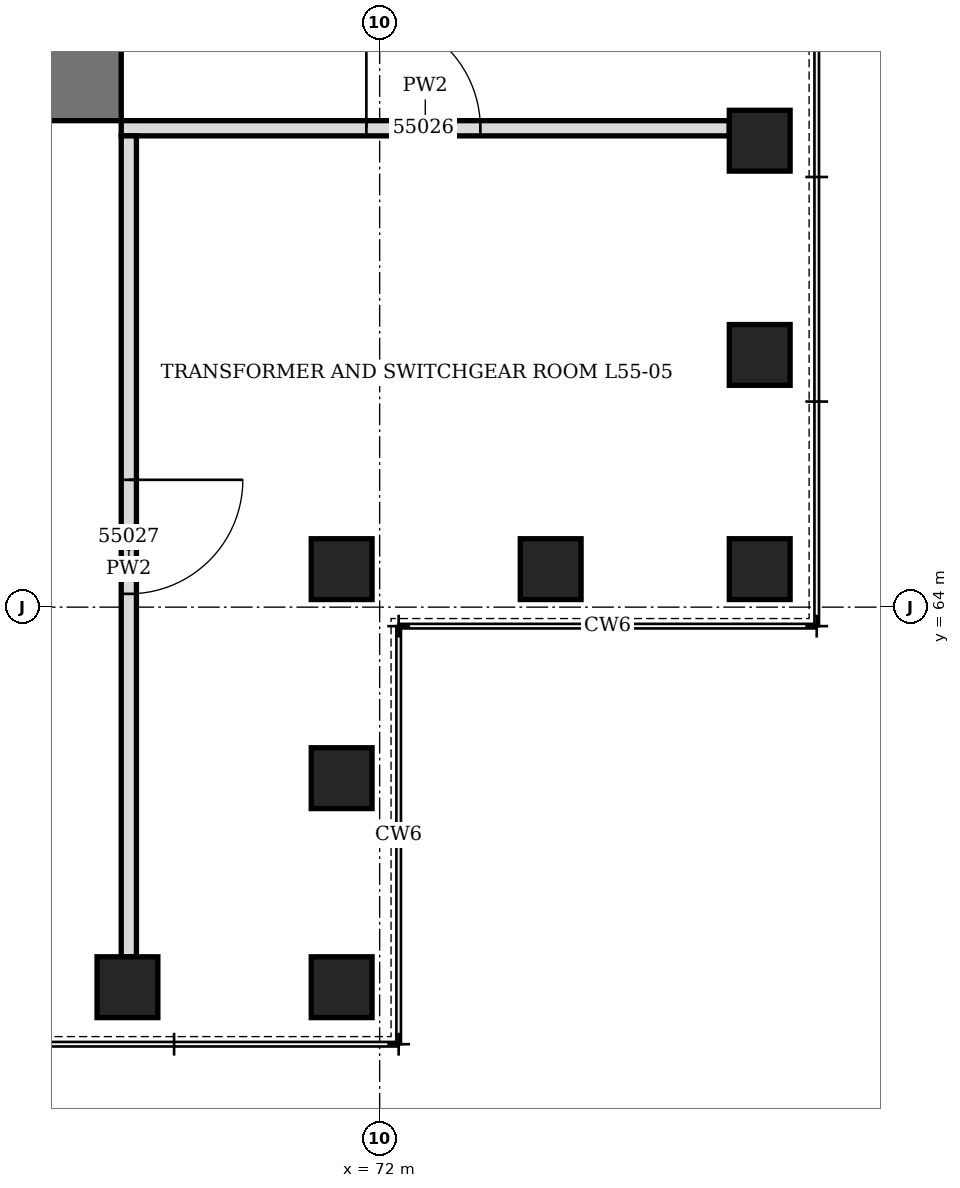
"""IFC4 building model, lengths in metres.
Left out: names, types, materials, properties, quantities, classifications, styles, units other than length and angle.
Written with IfcOpenShell. Run it as: python <this file> out.ifc"""

import sys

from ifc_helpers import new_model, si_unit, direction, frame, frame_2d, origin, origin_2d, place, context, subcontext, project, spatial, rectangle, hollow_rectangle, extrude, element, fill, save


model = new_model("IFC4")
c1 = context("Model", 3, precision=1e-05, world=origin(), true_north=direction((0.0, 1.0)))
c2 = subcontext(c1, "Body", "Model", "MODEL_VIEW")
j1 = project(units=[si_unit("LENGTHUNIT", "METRE"), si_unit("PLANEANGLEUNIT", "RADIAN")], contexts=[c1])
p1 = place(None, origin())
s1 = spatial("IfcSite", under=j1, at=p1, CompositionType="ELEMENT")
p2 = place(p1, origin())
s2 = spatial("IfcBuilding", under=s1, at=p2, CompositionType="ELEMENT")
p3 = place(p2, frame((0.0, 0.0, 244.3)))
s3 = spatial("IfcBuildingStorey", under=s2, at=p3, CompositionType="ELEMENT", Elevation=244.3)
for number, where, z_axis, x_axis in (
    (1, (68.682, 59.0, 0.0), (0.0, 0.0, 1.0), (1.0, 0.0, 0.0)),
    (2, (71.5, 59.0, 0.0), (0.0, 0.0, 1.0), (0.0, 1.0, 0.0)),
    (3, (71.5, 61.75, 0.0), (0.0, 0.0, 1.0), (0.0, 1.0, 0.0)),
    (4, (71.5, 64.5, 0.0), (0.0, 0.0, 1.0), (1.0, 0.0, 0.0)),
    (5, (74.25, 64.5, 0.0), (0.0, 0.0, 1.0), (1.0, 0.0, 0.0)),
    (6, (77.0, 64.5, 0.0), (0.0, 0.0, 1.0), (0.0, 1.0, 0.0)),
    (7, (77.0, 67.318, 0.0), (0.0, 0.0, 1.0), (0.0, 1.0, 0.0)),
    (8, (77.0, 70.136, 0.0), (0.0, 0.0, 1.0), (0.0, 1.0, 0.0)),
):
    element("IfcColumn", number, at=place(p3, frame(where, z_axis=z_axis, x_axis=x_axis)), inside=s3, PredefinedType="COLUMN", context=c2, shape_type="SweptSolid", body=[
        extrude(hollow_rectangle(XDim=0.8, YDim=0.8, WallThickness=0.15, at=origin_2d()), origin(), (0.0, 0.0, 1.0), 5.84),
    ])
p4 = place(p3, frame((68.0, 70.4, 0.0), z_axis=(0.0, 0.0, 1.0), x_axis=(0.0, 1.0, 0.0)))
e9 = element("IfcWall", 9, at=p4, inside=s3, PredefinedType="SHEAR", context=c2, shape_type="SweptSolid", body=[
    extrude(rectangle(XDim=19.2, YDim=1.2, at=frame_2d((9.6, 0.0))), origin(), (0.0, 0.0, 1.0), 6.0),
])
p5 = place(p4, frame((8.6, 0.0, 0.0)))
e10 = element("IfcOpeningElement", 10, at=p5, cuts=e9, PredefinedType="OPENING", context=c2, shape_type="SweptSolid", body=[
    extrude(rectangle(XDim=2.0, YDim=2.4, at=frame_2d((1.0, 1.2))), frame((0.0, 0.61, 0.0), z_axis=(0.0, -1.0, 0.0), x_axis=(1.0, 0.0, 0.0)), (0.0, 0.0, 1.0), 1.22),
])
p6 = place(p3, frame((68.6, 70.3, 0.0), z_axis=(0.0, 0.0, 1.0), x_axis=(1.0, 0.0, 0.0)))
e11 = element("IfcWall", 11, at=p6, inside=s3, PredefinedType="PARTITIONING", context=c2, shape_type="SweptSolid", body=[
    extrude(rectangle(XDim=8.0, YDim=0.2, at=frame_2d((4.0, 0.0))), origin(), (0.0, 0.0, 1.0), 5.84),
])
p7 = place(p6, frame((3.225, 0.0, 0.0)))
e12 = element("IfcOpeningElement", 12, at=p7, cuts=e11, PredefinedType="OPENING", context=c2, shape_type="SweptSolid", body=[
    extrude(rectangle(XDim=1.5, YDim=2.4, at=frame_2d((0.75, 1.2))), frame((0.0, 0.11, 0.0), z_axis=(0.0, -1.0, 0.0), x_axis=(1.0, 0.0, 0.0)), (0.0, 0.0, 1.0), 0.22),
])
p8 = place(p3, frame((68.7, 70.2, 0.0), z_axis=(0.0, 0.0, 1.0), x_axis=(0.0, -1.0, 0.0)))
e13 = element("IfcWall", 13, at=p8, inside=s3, PredefinedType="PARTITIONING", context=c2, shape_type="SweptSolid", body=[
    extrude(rectangle(XDim=10.8, YDim=0.2, at=frame_2d((5.4, 0.0))), origin(), (0.0, 0.0, 1.0), 5.078),
])
p9 = place(p8, frame((4.525, 0.0, 0.0)))
e14 = element("IfcOpeningElement", 14, at=p9, cuts=e13, PredefinedType="OPENING", context=c2, shape_type="SweptSolid", body=[
    extrude(rectangle(XDim=1.5, YDim=2.4, at=frame_2d((0.75, 1.2))), frame((0.0, 0.11, 0.0), z_axis=(0.0, -1.0, 0.0), x_axis=(1.0, 0.0, 0.0)), (0.0, 0.0, 1.0), 0.22),
])
p10 = place(p7, origin())
e15 = element("IfcDoor", 15, at=p10, inside=s3, OperationType="DOUBLE_DOOR_SINGLE_SWING", PredefinedType="DOOR", context=c2, shape_type="SweptSolid", body=[
    extrude(rectangle(XDim=1.5, YDim=2.4, at=frame_2d((0.75, 1.2))), frame((0.0, 0.1, 0.0), z_axis=(0.0, -1.0, 0.0), x_axis=(1.0, 0.0, 0.0)), (0.0, 0.0, 1.0), 0.199),
])
fill(e12, e15)
p11 = place(p9, origin())
e16 = element("IfcDoor", 16, at=p11, inside=s3, OperationType="DOUBLE_DOOR_SINGLE_SWING", PredefinedType="DOOR", context=c2, shape_type="SweptSolid", body=[
    extrude(rectangle(XDim=1.5, YDim=2.4, at=frame_2d((0.75, 1.2))), frame((0.0, 0.1, 0.0), z_axis=(0.0, -1.0, 0.0), x_axis=(1.0, 0.0, 0.0)), (0.0, 0.0, 1.0), 0.199),
])
fill(e14, e16)
save(model, sys.argv[1])
